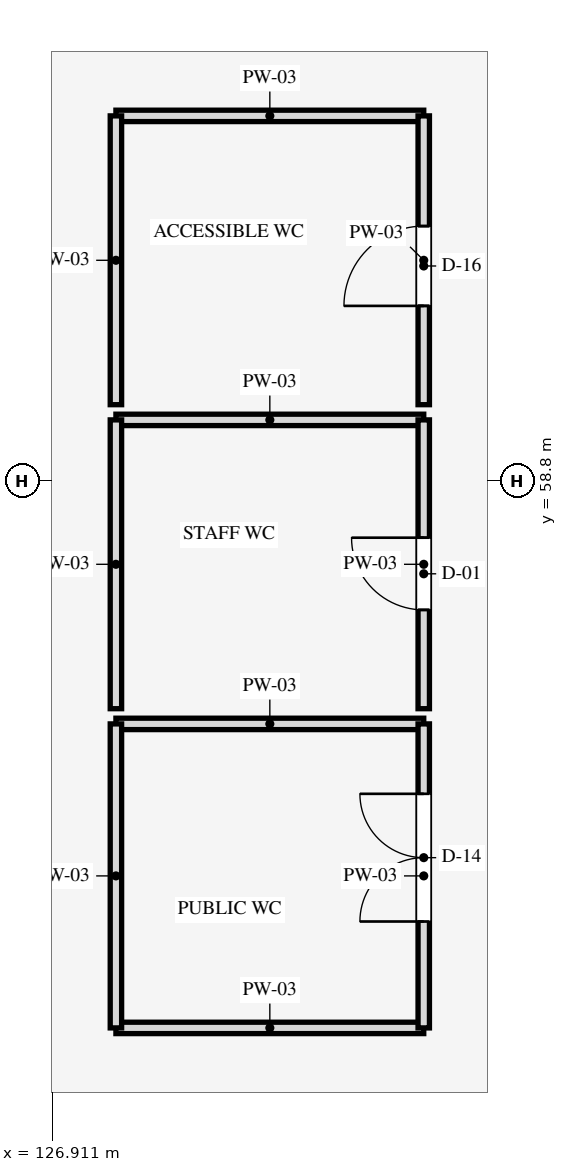
"""IFC4 building model, lengths in metres.
Left out: names, types, materials, properties, quantities, classifications, styles, units other than length and angle.
Written with IfcOpenShell. Run it as: python <this file> out.ifc"""

import sys

from ifc_helpers import new_model, si_unit, direction, frame, frame_2d, origin, place, context, subcontext, project, spatial, rectangle, extrude, element, fill, save


model = new_model("IFC4")
c1 = context("Model", 3, precision=1e-05, world=origin(), true_north=direction((0.0, 1.0)))
c2 = subcontext(c1, "Body", "Model", "MODEL_VIEW")
j1 = project(units=[si_unit("LENGTHUNIT", "METRE"), si_unit("PLANEANGLEUNIT", "RADIAN")], contexts=[c1])
p1 = place(None, origin())
s1 = spatial("IfcSite", under=j1, at=p1, CompositionType="ELEMENT")
p2 = place(p1, origin())
s2 = spatial("IfcBuilding", under=s1, at=p2, CompositionType="ELEMENT")
p3 = place(p2, frame((0.0, 0.0, 9.9)))
s3 = spatial("IfcBuildingStorey", under=s2, at=p3, CompositionType="ELEMENT", Elevation=9.9)
for number, where, z_axis, x_axis in (
    (1, (127.75, 51.6, 0.0), (0.0, 0.0, 1.0), (1.0, 0.0, 0.0)),
    (2, (127.75, 55.6, 0.0), (0.0, 0.0, 1.0), (1.0, 0.0, 0.0)),
):
    element("IfcWall", number, at=place(p3, frame(where, z_axis=z_axis, x_axis=x_axis)), inside=s3, PredefinedType="PARTITIONING", context=c2, shape_type="SweptSolid", body=[
        extrude(rectangle(XDim=4.05, YDim=0.15, at=frame_2d((2.025, 0.0))), origin(), (0.0, 0.0, 1.0), 3.54),
    ])
p4 = place(p3, frame((127.75, 51.6, 0.0), z_axis=(0.0, 0.0, 1.0), x_axis=(0.0, 1.0, 0.0)))
e3 = element("IfcWall", 3, at=p4, inside=s3, PredefinedType="PARTITIONING", context=c2, shape_type="SweptSolid", body=[
    extrude(rectangle(XDim=4.0, YDim=0.15, at=frame_2d((2.0, 0.0))), origin(), (0.0, 0.0, 1.0), 3.54),
])
p5 = place(p3, frame((131.8, 51.6, 0.0), z_axis=(0.0, 0.0, 1.0), x_axis=(0.0, 1.0, 0.0)))
e4 = element("IfcWall", 4, at=p5, inside=s3, PredefinedType="PARTITIONING", context=c2, shape_type="SweptSolid", body=[
    extrude(rectangle(XDim=4.0, YDim=0.15, at=frame_2d((2.0, 0.0))), origin(), (0.0, 0.0, 1.0), 3.54),
])
p6 = place(p5, frame((1.4, 0.0, 0.0)))
e5 = element("IfcOpeningElement", 5, at=p6, cuts=e4, PredefinedType="OPENING", context=c2, shape_type="SweptSolid", body=[
    extrude(rectangle(XDim=1.68, YDim=2.24, at=frame_2d((0.84, 1.12))), frame((0.0, 0.085, 0.0), z_axis=(0.0, -1.0, 0.0), x_axis=(1.0, 0.0, 0.0)), (0.0, 0.0, 1.0), 0.17),
])
p7 = place(p3, frame((127.75, 59.6, 0.0), z_axis=(0.0, 0.0, 1.0), x_axis=(1.0, 0.0, 0.0)))
e6 = element("IfcWall", 6, at=p7, inside=s3, PredefinedType="PARTITIONING", context=c2, shape_type="SweptSolid", body=[
    extrude(rectangle(XDim=4.05, YDim=0.15, at=frame_2d((2.025, 0.0))), origin(), (0.0, 0.0, 1.0), 3.54),
])
p8 = place(p3, frame((127.75, 55.8, 0.0), z_axis=(0.0, 0.0, 1.0), x_axis=(0.0, 1.0, 0.0)))
e7 = element("IfcWall", 7, at=p8, inside=s3, PredefinedType="PARTITIONING", context=c2, shape_type="SweptSolid", body=[
    extrude(rectangle(XDim=3.8, YDim=0.15, at=frame_2d((1.9, 0.0))), origin(), (0.0, 0.0, 1.0), 3.54),
])
p9 = place(p3, frame((131.8, 55.8, 0.0), z_axis=(0.0, 0.0, 1.0), x_axis=(0.0, 1.0, 0.0)))
e8 = element("IfcWall", 8, at=p9, inside=s3, PredefinedType="PARTITIONING", context=c2, shape_type="SweptSolid", body=[
    extrude(rectangle(XDim=3.8, YDim=0.15, at=frame_2d((1.9, 0.0))), origin(), (0.0, 0.0, 1.0), 3.54),
])
p10 = place(p9, frame((1.3, 0.0, 0.0)))
e9 = element("IfcOpeningElement", 9, at=p10, cuts=e8, PredefinedType="OPENING", context=c2, shape_type="SweptSolid", body=[
    extrude(rectangle(XDim=0.95, YDim=2.1, at=frame_2d((0.475, 1.05))), frame((0.0, 0.085, 0.0), z_axis=(0.0, -1.0, 0.0), x_axis=(1.0, 0.0, 0.0)), (0.0, 0.0, 1.0), 0.17),
])
p11 = place(p3, frame((127.75, 63.6, 0.0), z_axis=(0.0, 0.0, 1.0), x_axis=(1.0, 0.0, 0.0)))
e10 = element("IfcWall", 10, at=p11, inside=s3, PredefinedType="PARTITIONING", context=c2, shape_type="SweptSolid", body=[
    extrude(rectangle(XDim=4.05, YDim=0.15, at=frame_2d((2.025, 0.0))), origin(), (0.0, 0.0, 1.0), 3.54),
])
p12 = place(p3, frame((127.75, 59.8, 0.0), z_axis=(0.0, 0.0, 1.0), x_axis=(0.0, 1.0, 0.0)))
e11 = element("IfcWall", 11, at=p12, inside=s3, PredefinedType="PARTITIONING", context=c2, shape_type="SweptSolid", body=[
    extrude(rectangle(XDim=3.8, YDim=0.15, at=frame_2d((1.9, 0.0))), origin(), (0.0, 0.0, 1.0), 3.54),
])
p13 = place(p3, frame((131.8, 59.8, 0.0), z_axis=(0.0, 0.0, 1.0), x_axis=(0.0, 1.0, 0.0)))
e12 = element("IfcWall", 12, at=p13, inside=s3, PredefinedType="PARTITIONING", context=c2, shape_type="SweptSolid", body=[
    extrude(rectangle(XDim=3.8, YDim=0.15, at=frame_2d((1.9, 0.0))), origin(), (0.0, 0.0, 1.0), 3.54),
])
p14 = place(p13, frame((1.3, 0.0, 0.0)))
e13 = element("IfcOpeningElement", 13, at=p14, cuts=e12, PredefinedType="OPENING", context=c2, shape_type="SweptSolid", body=[
    extrude(rectangle(XDim=1.05, YDim=2.16, at=frame_2d((0.525, 1.08))), frame((0.0, 0.085, 0.0), z_axis=(0.0, -1.0, 0.0), x_axis=(1.0, 0.0, 0.0)), (0.0, 0.0, 1.0), 0.17),
])
p15 = place(p6, origin())
e14 = element("IfcDoor", 14, at=p15, inside=s3, OperationType="DOUBLE_DOOR_SINGLE_SWING", PredefinedType="DOOR", context=c2, shape_type="SweptSolid", body=[
    extrude(rectangle(XDim=1.68, YDim=2.24, at=frame_2d((0.84, 1.12))), frame((0.0, 0.025, 0.0), z_axis=(0.0, -1.0, 0.0), x_axis=(1.0, 0.0, 0.0)), (0.0, 0.0, 1.0), 0.05),
])
fill(e5, e14)
p16 = place(p10, origin())
e15 = element("IfcDoor", 15, at=p16, inside=s3, OperationType="SINGLE_SWING_RIGHT", PredefinedType="DOOR", context=c2, shape_type="SweptSolid", body=[
    extrude(rectangle(XDim=0.95, YDim=2.1, at=frame_2d((0.475, 1.05))), frame((0.0, 0.025, 0.0), z_axis=(0.0, -1.0, 0.0), x_axis=(1.0, 0.0, 0.0)), (0.0, 0.0, 1.0), 0.05),
])
fill(e9, e15)
p17 = place(p14, origin())
e16 = element("IfcDoor", 16, at=p17, inside=s3, OperationType="SINGLE_SWING_LEFT", PredefinedType="DOOR", context=c2, shape_type="SweptSolid", body=[
    extrude(rectangle(XDim=1.05, YDim=2.16, at=frame_2d((0.525, 1.08))), frame((0.0, 0.025, 0.0), z_axis=(0.0, -1.0, 0.0), x_axis=(1.0, 0.0, 0.0)), (0.0, 0.0, 1.0), 0.05),
])
fill(e13, e16)
save(model, sys.argv[1])
